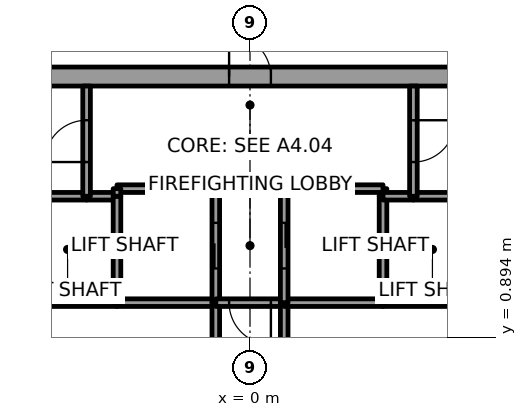
"""IFC4 building model, lengths in metres.
Left out: names, types, materials, properties, quantities, classifications, styles, units other than length and angle.
Written with IfcOpenShell. Run it as: python <this file> out.ifc"""

import sys

from ifc_helpers import new_model, si_unit, direction, frame, frame_2d, origin, place, context, subcontext, project, spatial, rectangle, extrude, element, fill, save


model = new_model("IFC4")
c1 = context("Model", 3, precision=1e-05, world=origin(), true_north=direction((0.0, 1.0)))
c2 = subcontext(c1, "Body", "Model", "MODEL_VIEW")
j1 = project(units=[si_unit("LENGTHUNIT", "METRE"), si_unit("PLANEANGLEUNIT", "RADIAN")], contexts=[c1])
p1 = place(None, origin())
s1 = spatial("IfcSite", under=j1, at=p1, CompositionType="ELEMENT")
p2 = place(p1, origin())
s2 = spatial("IfcBuilding", under=s1, at=p2, CompositionType="ELEMENT")
p3 = place(p2, frame((0.0, 0.0, 16.8)))
s3 = spatial("IfcBuildingStorey", under=s2, at=p3, CompositionType="ELEMENT", Elevation=16.8)
p4 = place(p3, frame((-11.0, 7.75, 0.0), z_axis=(0.0, 0.0, 1.0), x_axis=(1.0, 0.0, 0.0)))
e1 = element("IfcWall", 1, at=p4, inside=s3, PredefinedType="SHEAR", context=c2, shape_type="SweptSolid", body=[
    extrude(rectangle(XDim=22.0, YDim=0.5, at=frame_2d((11.0, 0.0))), origin(), (0.0, 0.0, 1.0), 5.4),
])
p5 = place(p4, frame((10.45, 0.0, 0.0)))
e2 = element("IfcOpeningElement", 2, at=p5, cuts=e1, PredefinedType="OPENING", context=c2, shape_type="SweptSolid", body=[
    extrude(rectangle(XDim=1.1, YDim=2.1, at=frame_2d((0.55, 1.05))), frame((0.0, 0.25, 0.0), z_axis=(0.0, -1.0, 0.0), x_axis=(1.0, 0.0, 0.0)), (0.0, 0.0, 1.0), 0.5),
])
p6 = place(p3, frame((-3.5, 1.8, 0.0), z_axis=(0.0, 0.0, 1.0), x_axis=(-1.0, 0.0, 0.0)))
e3 = element("IfcWall", 3, at=p6, inside=s3, PredefinedType="SOLIDWALL", context=c2, shape_type="SweptSolid", body=[
    extrude(rectangle(XDim=2.6, YDim=0.2, at=frame_2d((1.3, 0.0))), origin(), (0.0, 0.0, 1.0), 5.15),
])
p7 = place(p3, frame((-4.3, 4.6, 0.0), z_axis=(0.0, 0.0, 1.0), x_axis=(-1.0, 0.0, 0.0)))
e4 = element("IfcWall", 4, at=p7, inside=s3, PredefinedType="SOLIDWALL", context=c2, shape_type="SweptSolid", body=[
    extrude(rectangle(XDim=1.8, YDim=0.2, at=frame_2d((0.9, 0.0))), origin(), (0.0, 0.0, 1.0), 5.15),
])
p8 = place(p3, frame((-3.5, 4.6, 0.0), z_axis=(0.0, 0.0, 1.0), x_axis=(-1.0, 0.0, 0.0)))
e5 = element("IfcWall", 5, at=p8, inside=s3, PredefinedType="SOLIDWALL", context=c2, shape_type="SweptSolid", body=[
    extrude(rectangle(XDim=0.8, YDim=0.2, at=frame_2d((0.4, 0.0))), origin(), (0.0, 0.0, 1.0), 5.15),
])
p9 = place(p3, frame((-4.3, 4.6, 0.0), z_axis=(0.0, 0.0, 1.0), x_axis=(0.0, 1.0, 0.0)))
e6 = element("IfcWall", 6, at=p9, inside=s3, PredefinedType="SOLIDWALL", context=c2, shape_type="SweptSolid", body=[
    extrude(rectangle(XDim=2.9, YDim=0.2, at=frame_2d((1.45, 0.0))), origin(), (0.0, 0.0, 1.0), 5.15),
])
p10 = place(p9, frame((0.9, 0.0, 0.0)))
e7 = element("IfcOpeningElement", 7, at=p10, cuts=e6, PredefinedType="OPENING", context=c2, shape_type="SweptSolid", body=[
    extrude(rectangle(XDim=1.1, YDim=2.4, at=frame_2d((0.55, 1.2))), frame((0.0, 0.1, 0.0), z_axis=(0.0, -1.0, 0.0), x_axis=(1.0, 0.0, 0.0)), (0.0, 0.0, 1.0), 0.2),
])
p11 = place(p3, frame((-0.9, 1.8, 0.0), z_axis=(0.0, 0.0, 1.0), x_axis=(-1.0, 0.0, 0.0)))
e8 = element("IfcWall", 8, at=p11, inside=s3, PredefinedType="SOLIDWALL", context=c2, shape_type="SweptSolid", body=[
    extrude(rectangle(XDim=2.6, YDim=0.2, at=frame_2d((1.3, 0.0))), origin(), (0.0, 0.0, 1.0), 5.15),
])
p12 = place(p3, frame((-3.5, 4.6, 0.0), z_axis=(0.0, 0.0, 1.0), x_axis=(0.0, -1.0, 0.0)))
e9 = element("IfcWall", 9, at=p12, inside=s3, PredefinedType="SOLIDWALL", context=c2, shape_type="SweptSolid", body=[
    extrude(rectangle(XDim=2.8, YDim=0.2, at=frame_2d((1.4, 0.0))), origin(), (0.0, 0.0, 1.0), 5.15),
])
p13 = place(p3, frame((-0.9, 1.8, 0.0), z_axis=(0.0, 0.0, 1.0), x_axis=(0.0, 1.0, 0.0)))
e10 = element("IfcWall", 10, at=p13, inside=s3, PredefinedType="SOLIDWALL", context=c2, shape_type="SweptSolid", body=[
    extrude(rectangle(XDim=3.0, YDim=0.2, at=frame_2d((1.5, 0.0))), origin(), (0.0, 0.0, 1.0), 5.15),
])
p14 = place(p13, frame((0.9, 0.0, 0.0)))
e11 = element("IfcOpeningElement", 11, at=p14, cuts=e10, PredefinedType="OPENING", context=c2, shape_type="SweptSolid", body=[
    extrude(rectangle(XDim=1.2, YDim=2.1, at=frame_2d((0.6, 1.05))), frame((0.0, 0.1, 0.0), z_axis=(0.0, -1.0, 0.0), x_axis=(1.0, 0.0, 0.0)), (0.0, 0.0, 1.0), 0.2),
])
p15 = place(p3, frame((-0.9, 4.8, 0.0), z_axis=(0.0, 0.0, 1.0), x_axis=(-1.0, 0.0, 0.0)))
e12 = element("IfcWall", 12, at=p15, inside=s3, PredefinedType="SOLIDWALL", context=c2, shape_type="SweptSolid", body=[
    extrude(rectangle(XDim=2.6, YDim=0.2, at=frame_2d((1.3, 0.0))), origin(), (0.0, 0.0, 1.0), 5.15),
])
p16 = place(p3, frame((-3.5, 4.8, 0.0), z_axis=(0.0, 0.0, 1.0), x_axis=(0.0, -1.0, 0.0)))
e13 = element("IfcWall", 13, at=p16, inside=s3, PredefinedType="SOLIDWALL", context=c2, shape_type="SweptSolid", body=[
    extrude(rectangle(XDim=0.2, YDim=0.2, at=frame_2d((0.1, 0.0))), origin(), (0.0, 0.0, 1.0), 5.15),
])
p17 = place(p3, frame((-0.9, 1.8, 0.0), z_axis=(0.0, 0.0, 1.0), x_axis=(0.0, -1.0, 0.0)))
e14 = element("IfcWall", 14, at=p17, inside=s3, PredefinedType="SOLIDWALL", context=c2, shape_type="SweptSolid", body=[
    extrude(rectangle(XDim=3.6, YDim=0.2, at=frame_2d((1.8, 0.0))), origin(), (0.0, 0.0, 1.0), 5.15),
])
p18 = place(p17, frame((1.05, 0.0, 0.0)))
e15 = element("IfcOpeningElement", 15, at=p18, cuts=e14, PredefinedType="OPENING", context=c2, shape_type="SweptSolid", body=[
    extrude(rectangle(XDim=1.5, YDim=2.4, at=frame_2d((0.75, 1.2))), frame((0.0, 0.1, 0.0), z_axis=(0.0, -1.0, 0.0), x_axis=(1.0, 0.0, 0.0)), (0.0, 0.0, 1.0), 0.2),
])
p19 = place(p3, frame((0.9, 1.8, 0.0), z_axis=(0.0, 0.0, 1.0), x_axis=(-1.0, 0.0, 0.0)))
e16 = element("IfcWall", 16, at=p19, inside=s3, PredefinedType="SOLIDWALL", context=c2, shape_type="SweptSolid", body=[
    extrude(rectangle(XDim=1.8, YDim=0.2, at=frame_2d((0.9, 0.0))), origin(), (0.0, 0.0, 1.0), 5.15),
])
p20 = place(p19, frame((0.35, 0.0, 0.0)))
e17 = element("IfcOpeningElement", 17, at=p20, cuts=e16, PredefinedType="OPENING", context=c2, shape_type="SweptSolid", body=[
    extrude(rectangle(XDim=1.1, YDim=2.4, at=frame_2d((0.55, 1.2))), frame((0.0, 0.1, 0.0), z_axis=(0.0, -1.0, 0.0), x_axis=(1.0, 0.0, 0.0)), (0.0, 0.0, 1.0), 0.2),
])
p21 = place(p3, frame((0.9, -1.8, 0.0), z_axis=(0.0, 0.0, 1.0), x_axis=(0.0, 1.0, 0.0)))
e18 = element("IfcWall", 18, at=p21, inside=s3, PredefinedType="SOLIDWALL", context=c2, shape_type="SweptSolid", body=[
    extrude(rectangle(XDim=3.6, YDim=0.2, at=frame_2d((1.8, 0.0))), origin(), (0.0, 0.0, 1.0), 5.15),
])
p22 = place(p21, frame((1.05, 0.0, 0.0)))
e19 = element("IfcOpeningElement", 19, at=p22, cuts=e18, PredefinedType="OPENING", context=c2, shape_type="SweptSolid", body=[
    extrude(rectangle(XDim=1.5, YDim=2.4, at=frame_2d((0.75, 1.2))), frame((0.0, 0.1, 0.0), z_axis=(0.0, -1.0, 0.0), x_axis=(1.0, 0.0, 0.0)), (0.0, 0.0, 1.0), 0.2),
])
p23 = place(p3, frame((3.5, 1.8, 0.0), z_axis=(0.0, 0.0, 1.0), x_axis=(-1.0, 0.0, 0.0)))
e20 = element("IfcWall", 20, at=p23, inside=s3, PredefinedType="SOLIDWALL", context=c2, shape_type="SweptSolid", body=[
    extrude(rectangle(XDim=2.6, YDim=0.2, at=frame_2d((1.3, 0.0))), origin(), (0.0, 0.0, 1.0), 5.15),
])
p24 = place(p3, frame((3.5, 4.6, 0.0), z_axis=(0.0, 0.0, 1.0), x_axis=(0.0, 1.0, 0.0)))
e21 = element("IfcWall", 21, at=p24, inside=s3, PredefinedType="SOLIDWALL", context=c2, shape_type="SweptSolid", body=[
    extrude(rectangle(XDim=0.2, YDim=0.2, at=frame_2d((0.1, 0.0))), origin(), (0.0, 0.0, 1.0), 5.15),
])
p25 = place(p3, frame((3.5, 4.8, 0.0), z_axis=(0.0, 0.0, 1.0), x_axis=(-1.0, 0.0, 0.0)))
e22 = element("IfcWall", 22, at=p25, inside=s3, PredefinedType="SOLIDWALL", context=c2, shape_type="SweptSolid", body=[
    extrude(rectangle(XDim=2.6, YDim=0.2, at=frame_2d((1.3, 0.0))), origin(), (0.0, 0.0, 1.0), 5.15),
])
p26 = place(p3, frame((0.9, 4.8, 0.0), z_axis=(0.0, 0.0, 1.0), x_axis=(0.0, -1.0, 0.0)))
e23 = element("IfcWall", 23, at=p26, inside=s3, PredefinedType="SOLIDWALL", context=c2, shape_type="SweptSolid", body=[
    extrude(rectangle(XDim=3.0, YDim=0.2, at=frame_2d((1.5, 0.0))), origin(), (0.0, 0.0, 1.0), 5.15),
])
p27 = place(p26, frame((0.9, 0.0, 0.0)))
e24 = element("IfcOpeningElement", 24, at=p27, cuts=e23, PredefinedType="OPENING", context=c2, shape_type="SweptSolid", body=[
    extrude(rectangle(XDim=1.2, YDim=2.1, at=frame_2d((0.6, 1.05))), frame((0.0, 0.1, 0.0), z_axis=(0.0, -1.0, 0.0), x_axis=(1.0, 0.0, 0.0)), (0.0, 0.0, 1.0), 0.2),
])
p28 = place(p3, frame((6.1, 1.8, 0.0), z_axis=(0.0, 0.0, 1.0), x_axis=(-1.0, 0.0, 0.0)))
e25 = element("IfcWall", 25, at=p28, inside=s3, PredefinedType="SOLIDWALL", context=c2, shape_type="SweptSolid", body=[
    extrude(rectangle(XDim=2.6, YDim=0.2, at=frame_2d((1.3, 0.0))), origin(), (0.0, 0.0, 1.0), 5.15),
])
p29 = place(p3, frame((3.5, 1.8, 0.0), z_axis=(0.0, 0.0, 1.0), x_axis=(0.0, 1.0, 0.0)))
e26 = element("IfcWall", 26, at=p29, inside=s3, PredefinedType="SOLIDWALL", context=c2, shape_type="SweptSolid", body=[
    extrude(rectangle(XDim=2.8, YDim=0.2, at=frame_2d((1.4, 0.0))), origin(), (0.0, 0.0, 1.0), 5.15),
])
p30 = place(p3, frame((4.3, 4.6, 0.0), z_axis=(0.0, 0.0, 1.0), x_axis=(-1.0, 0.0, 0.0)))
e27 = element("IfcWall", 27, at=p30, inside=s3, PredefinedType="SOLIDWALL", context=c2, shape_type="SweptSolid", body=[
    extrude(rectangle(XDim=0.8, YDim=0.2, at=frame_2d((0.4, 0.0))), origin(), (0.0, 0.0, 1.0), 5.15),
])
p31 = place(p3, frame((6.1, 4.6, 0.0), z_axis=(0.0, 0.0, 1.0), x_axis=(-1.0, 0.0, 0.0)))
e28 = element("IfcWall", 28, at=p31, inside=s3, PredefinedType="SOLIDWALL", context=c2, shape_type="SweptSolid", body=[
    extrude(rectangle(XDim=1.8, YDim=0.2, at=frame_2d((0.9, 0.0))), origin(), (0.0, 0.0, 1.0), 5.15),
])
p32 = place(p3, frame((4.3, 7.5, 0.0), z_axis=(0.0, 0.0, 1.0), x_axis=(0.0, -1.0, 0.0)))
e29 = element("IfcWall", 29, at=p32, inside=s3, PredefinedType="SOLIDWALL", context=c2, shape_type="SweptSolid", body=[
    extrude(rectangle(XDim=2.9, YDim=0.2, at=frame_2d((1.45, 0.0))), origin(), (0.0, 0.0, 1.0), 5.15),
])
p33 = place(p32, frame((0.9, 0.0, 0.0)))
e30 = element("IfcOpeningElement", 30, at=p33, cuts=e29, PredefinedType="OPENING", context=c2, shape_type="SweptSolid", body=[
    extrude(rectangle(XDim=1.1, YDim=2.4, at=frame_2d((0.55, 1.2))), frame((0.0, 0.1, 0.0), z_axis=(0.0, -1.0, 0.0), x_axis=(1.0, 0.0, 0.0)), (0.0, 0.0, 1.0), 0.2),
])
p34 = place(p14, origin())
e31 = element("IfcDoor", 31, at=p34, inside=s3, OperationType="SLIDING_TO_RIGHT", PredefinedType="DOOR", context=c2, shape_type="SweptSolid", body=[
    extrude(rectangle(XDim=1.2, YDim=2.1, at=frame_2d((0.6, 1.05))), frame((0.0, 0.025, 0.0), z_axis=(0.0, -1.0, 0.0), x_axis=(1.0, 0.0, 0.0)), (0.0, 0.0, 1.0), 0.05),
])
fill(e11, e31)
p35 = place(p27, origin())
e32 = element("IfcDoor", 32, at=p35, inside=s3, OperationType="SLIDING_TO_RIGHT", PredefinedType="DOOR", context=c2, shape_type="SweptSolid", body=[
    extrude(rectangle(XDim=1.2, YDim=2.1, at=frame_2d((0.6, 1.05))), frame((0.0, 0.025, 0.0), z_axis=(0.0, -1.0, 0.0), x_axis=(1.0, 0.0, 0.0)), (0.0, 0.0, 1.0), 0.05),
])
fill(e24, e32)
p36 = place(p20, origin())
e33 = element("IfcDoor", 33, at=p36, inside=s3, OperationType="SINGLE_SWING_RIGHT", PredefinedType="DOOR", context=c2, shape_type="SweptSolid", body=[
    extrude(rectangle(XDim=1.1, YDim=2.4, at=frame_2d((0.55, 1.2))), frame((0.0, 0.025, 0.0), z_axis=(0.0, -1.0, 0.0), x_axis=(1.0, 0.0, 0.0)), (0.0, 0.0, 1.0), 0.05),
])
fill(e17, e33)
p37 = place(p10, origin())
e34 = element("IfcDoor", 34, at=p37, inside=s3, OperationType="SINGLE_SWING_LEFT", PredefinedType="DOOR", context=c2, shape_type="SweptSolid", body=[
    extrude(rectangle(XDim=1.1, YDim=2.4, at=frame_2d((0.55, 1.2))), frame((0.0, 0.025, 0.0), z_axis=(0.0, -1.0, 0.0), x_axis=(1.0, 0.0, 0.0)), (0.0, 0.0, 1.0), 0.05),
])
fill(e7, e34)
p38 = place(p33, origin())
e35 = element("IfcDoor", 35, at=p38, inside=s3, OperationType="SINGLE_SWING_RIGHT", PredefinedType="DOOR", context=c2, shape_type="SweptSolid", body=[
    extrude(rectangle(XDim=1.1, YDim=2.4, at=frame_2d((0.55, 1.2))), frame((0.0, 0.025, 0.0), z_axis=(0.0, -1.0, 0.0), x_axis=(1.0, 0.0, 0.0)), (0.0, 0.0, 1.0), 0.05),
])
fill(e30, e35)
p39 = place(p5, origin())
e36 = element("IfcDoor", 36, at=p39, inside=s3, OperationType="SINGLE_SWING_LEFT", PredefinedType="DOOR", context=c2, shape_type="SweptSolid", body=[
    extrude(rectangle(XDim=1.1, YDim=2.1, at=frame_2d((0.55, 1.05))), frame((0.0, 0.025, 0.0), z_axis=(0.0, -1.0, 0.0), x_axis=(1.0, 0.0, 0.0)), (0.0, 0.0, 1.0), 0.05),
])
fill(e2, e36)
save(model, sys.argv[1])
